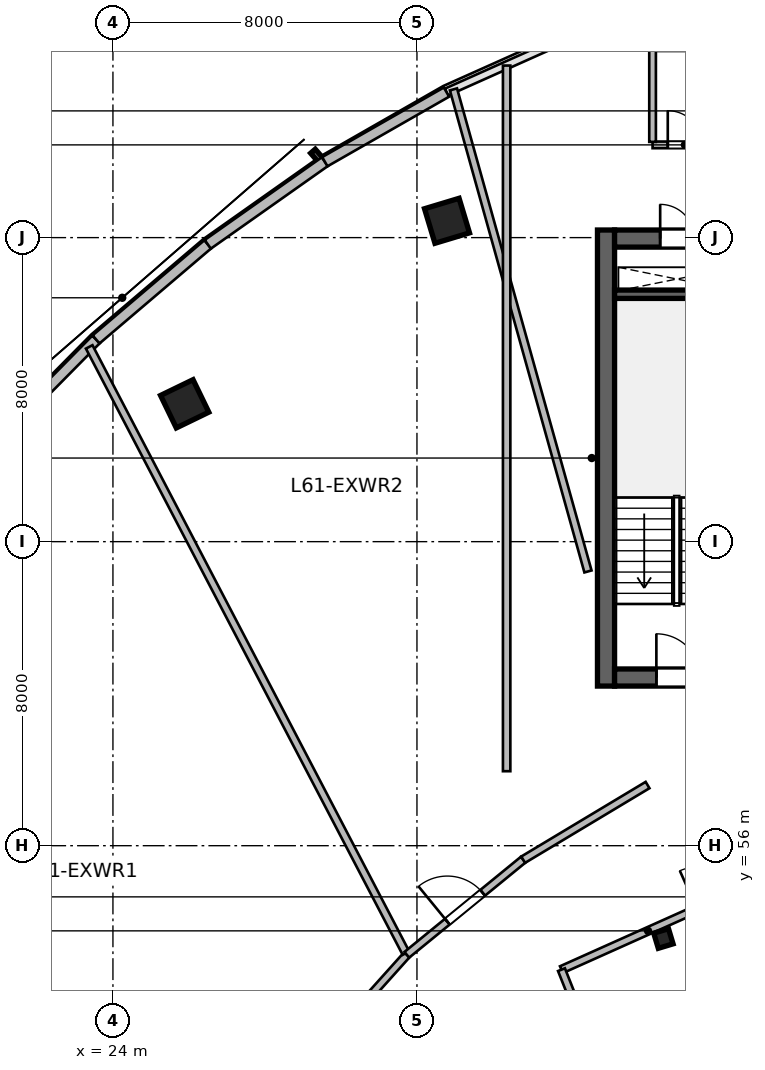
"""IFC4 building model, lengths in metres.
Left out: names, types, materials, properties, quantities, classifications, styles, units other than length and angle.
Written with IfcOpenShell. Run it as: python <this file> out.ifc"""

import sys

from ifc_helpers import new_model, si_unit, direction, frame, frame_2d, origin, origin_2d, place, context, subcontext, project, spatial, rectangle, i_section, extrude, source, transform, mapped, element, fill, save


model = new_model("IFC4")
c1 = context("Model", 3, precision=1e-05, world=origin(), true_north=direction((0.0, 1.0)))
c2 = subcontext(c1, "Body", "Model", "MODEL_VIEW")
j1 = project(units=[si_unit("LENGTHUNIT", "METRE"), si_unit("PLANEANGLEUNIT", "RADIAN")], contexts=[c1])
p1 = place(None, origin())
s1 = spatial("IfcSite", under=j1, at=p1, CompositionType="ELEMENT")
p2 = place(p1, origin())
s2 = spatial("IfcBuilding", under=s1, at=p2, CompositionType="ELEMENT")
p3 = place(p2, frame((0.0, 0.0, 250.8)))
s3 = spatial("IfcBuildingStorey", under=s2, at=p3, CompositionType="ELEMENT", Elevation=250.8)
m1 = source(origin(), c2, "Body", "SweptSolid", [
    extrude(rectangle(XDim=12.0, YDim=0.45, at=frame_2d((6.0, 0.0))), origin(), (0.0, 0.0, 1.0), 3.9),
])
p4 = place(p3, frame((36.975, 60.2, 0.0), z_axis=(0.0, 0.0, 1.0), x_axis=(0.0, 1.0, 0.0)))
e1 = element("IfcWall", 1, at=p4, inside=s3, PredefinedType="SHEAR", context=c2, shape_type="MappedRepresentation", body=[
    mapped(m1, transform((0.0, 0.0, 0.0), scale=1.0)),
])
m2 = source(origin(), c2, "Body", "SweptSolid", [
    extrude(rectangle(XDim=21.6, YDim=0.45, at=frame_2d((10.8, 0.0))), origin(), (0.0, 0.0, 1.0), 3.9),
])
p5 = place(p3, frame((37.2, 60.425, 0.0), z_axis=(0.0, 0.0, 1.0), x_axis=(1.0, 0.0, 0.0)))
e2 = element("IfcWall", 2, at=p5, inside=s3, PredefinedType="SHEAR", context=c2, shape_type="MappedRepresentation", body=[
    mapped(m2, transform((0.0, 0.0, 0.0), scale=1.0)),
])
p6 = place(p5, frame((1.1, 0.0, 0.0)))
e3 = element("IfcOpeningElement", 3, at=p6, cuts=e2, PredefinedType="OPENING", context=c2, shape_type="SweptSolid", body=[
    extrude(rectangle(XDim=1.15, YDim=2.15, at=frame_2d((0.575, 1.075))), frame((0.0, 0.235, 0.0), z_axis=(0.0, -1.0, 0.0), x_axis=(1.0, 0.0, 0.0)), (0.0, 0.0, 1.0), 0.47),
])
p7 = place(p5, frame((19.5, 0.0, 0.0)))
e4 = element("IfcOpeningElement", 4, at=p7, cuts=e2, PredefinedType="OPENING", context=c2, shape_type="SweptSolid", body=[
    extrude(rectangle(XDim=0.9, YDim=2.1, at=frame_2d((0.45, 1.05))), frame((0.0, 0.235, 0.0), z_axis=(0.0, -1.0, 0.0), x_axis=(1.0, 0.0, 0.0)), (0.0, 0.0, 1.0), 0.47),
])
p8 = place(p5, frame((12.02, 0.0, 0.0)))
e5 = element("IfcOpeningElement", 5, at=p8, cuts=e2, PredefinedType="OPENING", context=c2, shape_type="SweptSolid", body=[
    extrude(rectangle(XDim=1.6, YDim=2.15, at=frame_2d((0.8, 1.075))), frame((0.0, 0.235, 0.0), z_axis=(0.0, -1.0, 0.0), x_axis=(1.0, 0.0, 0.0)), (0.0, 0.0, 1.0), 0.47),
])
p9 = place(p3, frame((37.2, 71.975, 0.0), z_axis=(0.0, 0.0, 1.0), x_axis=(1.0, 0.0, 0.0)))
e6 = element("IfcWall", 6, at=p9, inside=s3, PredefinedType="SHEAR", context=c2, shape_type="MappedRepresentation", body=[
    mapped(m2, transform((0.0, 0.0, 0.0), scale=1.0)),
])
p10 = place(p9, frame((1.2, 0.0, 0.0)))
e7 = element("IfcOpeningElement", 7, at=p10, cuts=e6, PredefinedType="OPENING", context=c2, shape_type="SweptSolid", body=[
    extrude(rectangle(XDim=0.9, YDim=2.1, at=frame_2d((0.45, 1.05))), frame((0.0, 0.235, 0.0), z_axis=(0.0, -1.0, 0.0), x_axis=(1.0, 0.0, 0.0)), (0.0, 0.0, 1.0), 0.47),
])
p11 = place(p9, frame((14.7, 0.0, 0.0)))
e8 = element("IfcOpeningElement", 8, at=p11, cuts=e6, PredefinedType="OPENING", context=c2, shape_type="SweptSolid", body=[
    extrude(rectangle(XDim=1.2, YDim=2.15, at=frame_2d((0.6, 1.075))), frame((0.0, 0.235, 0.0), z_axis=(0.0, -1.0, 0.0), x_axis=(1.0, 0.0, 0.0)), (0.0, 0.0, 1.0), 0.47),
])
p12 = place(p9, frame((4.15, 0.0, 0.0)))
e9 = element("IfcOpeningElement", 9, at=p12, cuts=e6, PredefinedType="OPENING", context=c2, shape_type="SweptSolid", body=[
    extrude(rectangle(XDim=1.3, YDim=2.15, at=frame_2d((0.65, 1.075))), frame((0.0, 0.235, 0.0), z_axis=(0.0, -1.0, 0.0), x_axis=(1.0, 0.0, 0.0)), (0.0, 0.0, 1.0), 0.47),
])
p13 = place(p9, frame((7.25, 0.0, 0.0)))
e10 = element("IfcOpeningElement", 10, at=p13, cuts=e6, PredefinedType="OPENING", context=c2, shape_type="SweptSolid", body=[
    extrude(rectangle(XDim=0.9, YDim=2.1, at=frame_2d((0.45, 1.05))), frame((0.0, 0.235, 0.0), z_axis=(0.0, -1.0, 0.0), x_axis=(1.0, 0.0, 0.0)), (0.0, 0.0, 1.0), 0.47),
])
m3 = source(origin(), c2, "Body", "SweptSolid", [
    extrude(rectangle(XDim=3.27, YDim=0.22, at=frame_2d((1.635, 0.0))), origin(), (0.0, 0.0, 1.0), 3.9),
])
p14 = place(p3, frame((37.2, 70.51, 0.0), z_axis=(0.0, 0.0, 1.0), x_axis=(1.0, 0.0, 0.0)))
e11 = element("IfcWall", 11, at=p14, inside=s3, PredefinedType="SHEAR", context=c2, shape_type="MappedRepresentation", body=[
    mapped(m3, transform((0.0, 0.0, 0.0), scale=1.0)),
])
m4 = source(origin(), c2, "Body", "SweptSolid", [
    extrude(rectangle(XDim=0.95, YDim=0.95, at=origin_2d()), origin(), (0.0, 0.0, 1.0), 3.9),
])
p15 = place(p3, frame((25.888, 67.627, 0.0), z_axis=(0.0, 0.0, 1.0), x_axis=(-0.436173672171, 0.899862504889, 0.0)))
e12 = element("IfcColumn", 12, at=p15, inside=s3, PredefinedType="COLUMN", context=c2, shape_type="MappedRepresentation", body=[
    mapped(m4, transform((0.0, 0.0, 0.0), scale=1.0)),
])
m5 = source(origin(), c2, "Body", "SweptSolid", [
    extrude(i_section(OverallWidth=0.406, OverallDepth=0.416, WebThickness=0.03, FlangeThickness=0.048, at=origin_2d()), origin(), (0.0, 0.0, 1.0), 3.9),
])
p16 = place(p3, frame((38.485, 53.558, 0.0), z_axis=(0.0, 0.0, 1.0), x_axis=(-0.288697611798, 0.957420330337, 0.0)))
e13 = element("IfcColumn", 13, at=p16, inside=s3, PredefinedType="COLUMN", context=c2, shape_type="MappedRepresentation", body=[
    mapped(m5, transform((0.0, 0.0, 0.0), scale=1.0)),
])
p17 = place(p3, frame((32.791, 72.442, 0.0), z_axis=(0.0, 0.0, 1.0), x_axis=(-0.288697611798, 0.957420330337, 0.0)))
e14 = element("IfcColumn", 14, at=p17, inside=s3, PredefinedType="COLUMN", context=c2, shape_type="MappedRepresentation", body=[
    mapped(m4, transform((0.0, 0.0, 0.0), scale=1.0)),
])
m6 = source(origin(), c2, "Body", "SweptSolid", [
    extrude(rectangle(XDim=3.955, YDim=0.28, at=frame_2d((1.978, 0.0))), origin(), (0.0, 0.0, 1.0), 3.58),
])
p18 = place(p3, frame((20.776, 66.507, 0.0), z_axis=(0.0, 0.0, 1.0), x_axis=(0.702710517474, 0.711475880569, 0.0)))
e15 = element("IfcWall", 15, at=p18, inside=s3, PredefinedType="SOLIDWALL", context=c2, shape_type="MappedRepresentation", body=[
    mapped(m6, transform((0.0, 0.0, 0.0), scale=1.0)),
])
m7 = source(origin(), c2, "Body", "SweptSolid", [
    extrude(rectangle(XDim=3.86, YDim=0.28, at=frame_2d((1.93, 0.0))), origin(), (0.0, 0.0, 1.0), 3.58),
])
p19 = place(p3, frame((23.556, 69.321, 0.0), z_axis=(0.0, 0.0, 1.0), x_axis=(0.761497547739, 0.648167790613, 0.0)))
e16 = element("IfcWall", 16, at=p19, inside=s3, PredefinedType="SOLIDWALL", context=c2, shape_type="MappedRepresentation", body=[
    mapped(m7, transform((0.0, 0.0, 0.0), scale=1.0)),
])
m8 = source(origin(), c2, "Body", "SweptSolid", [
    extrude(rectangle(XDim=3.77, YDim=0.28, at=frame_2d((1.885, 0.0))), origin(), (0.0, 0.0, 1.0), 3.58),
])
p20 = place(p3, frame((26.495, 71.823, 0.0), z_axis=(0.0, 0.0, 1.0), x_axis=(0.817001958662, 0.576634892755, 0.0)))
e17 = element("IfcWall", 17, at=p20, inside=s3, PredefinedType="SOLIDWALL", context=c2, shape_type="MappedRepresentation", body=[
    mapped(m8, transform((0.0, 0.0, 0.0), scale=1.0)),
])
m9 = source(origin(), c2, "Body", "SweptSolid", [
    extrude(rectangle(XDim=3.688, YDim=0.28, at=frame_2d((1.844, 0.0))), origin(), (0.0, 0.0, 1.0), 3.58),
])
p21 = place(p3, frame((29.576, 73.998, 0.0), z_axis=(0.0, 0.0, 1.0), x_axis=(0.867929289274, 0.496687778005, 0.0)))
e18 = element("IfcWall", 18, at=p21, inside=s3, PredefinedType="SOLIDWALL", context=c2, shape_type="MappedRepresentation", body=[
    mapped(m9, transform((0.0, 0.0, 0.0), scale=1.0)),
])
m10 = source(origin(), c2, "Body", "SweptSolid", [
    extrude(rectangle(XDim=4.0, YDim=0.175, at=frame_2d((2.0, 0.0))), origin(), (0.0, 0.0, 1.0), 3.58),
])
p22 = place(p3, frame((38.2, 74.44, 0.0), z_axis=(0.0, 0.0, 1.0), x_axis=(1.0, 0.0, 0.0)))
e19 = element("IfcWall", 19, at=p22, inside=s3, PredefinedType="PARTITIONING", context=c2, shape_type="MappedRepresentation", body=[
    mapped(m10, transform((0.0, 0.0, 0.0), scale=1.0)),
])
p23 = place(p22, frame((0.4, 0.0, 0.0)))
e20 = element("IfcOpeningElement", 20, at=p23, cuts=e19, PredefinedType="OPENING", context=c2, shape_type="SweptSolid", body=[
    extrude(rectangle(XDim=0.9, YDim=2.08, at=frame_2d((0.45, 1.04))), frame((0.0, 0.098, 0.0), z_axis=(0.0, -1.0, 0.0), x_axis=(1.0, 0.0, 0.0)), (0.0, 0.0, 1.0), 0.195),
])
m11 = source(origin(), c2, "Body", "SweptSolid", [
    extrude(rectangle(XDim=2.403, YDim=0.175, at=frame_2d((1.201, 0.0))), origin(), (0.0, 0.0, 1.0), 3.58),
])
p24 = place(p3, frame((38.2, 74.519, 0.0), z_axis=(0.0, 0.0, 1.0), x_axis=(0.0, 1.0, 0.0)))
e21 = element("IfcWall", 21, at=p24, inside=s3, PredefinedType="PARTITIONING", context=c2, shape_type="MappedRepresentation", body=[
    mapped(m11, transform((0.0, 0.0, 0.0), scale=1.0)),
])
m12 = source(origin(), c2, "Body", "SweptSolid", [
    extrude(rectangle(XDim=8.913, YDim=0.195, at=frame_2d((4.457, 0.0))), origin(), (0.0, 0.0, 1.0), 3.58),
])
p25 = place(p3, frame((35.803, 52.738, 0.0), z_axis=(0.0, 0.0, 1.0), x_axis=(0.912488521546, 0.409102307555, 0.0)))
e22 = element("IfcWall", 22, at=p25, inside=s3, PredefinedType="PARTITIONING", context=c2, shape_type="MappedRepresentation", body=[
    mapped(m12, transform((0.0, 0.0, 0.0), scale=1.0)),
])
p26 = place(p25, frame((3.906, 0.0, 0.0)))
e23 = element("IfcOpeningElement", 23, at=p26, cuts=e22, PredefinedType="OPENING", context=c2, shape_type="SweptSolid", body=[
    extrude(rectangle(XDim=1.1, YDim=2.15, at=frame_2d((0.55, 1.075))), frame((0.0, 0.107, 0.0), z_axis=(0.0, -1.0, 0.0), x_axis=(1.0, 0.0, 0.0)), (0.0, 0.0, 1.0), 0.215),
])
m13 = source(origin(), c2, "Body", "SweptSolid", [
    extrude(rectangle(XDim=3.749, YDim=0.195, at=frame_2d((1.875, 0.0))), origin(), (0.0, 0.0, 1.0), 3.58),
])
p27 = place(p3, frame((37.186, 49.254, 0.0), z_axis=(0.0, 0.0, 1.0), x_axis=(-0.368851771682, 0.92948823044, 0.0)))
e24 = element("IfcWall", 24, at=p27, inside=s3, PredefinedType="PARTITIONING", context=c2, shape_type="MappedRepresentation", body=[
    mapped(m13, transform((0.0, 0.0, 0.0), scale=1.0)),
])
m14 = source(origin(), c2, "Body", "SweptSolid", [
    extrude(rectangle(XDim=5.407, YDim=0.195, at=frame_2d((2.704, 0.0))), origin(), (0.0, 0.0, 1.0), 3.58),
])
p28 = place(p3, frame((28.122, 49.105, 0.0), z_axis=(0.0, 0.0, 1.0), x_axis=(0.667851383423, 0.744294652447, 0.0)))
e25 = element("IfcWall", 25, at=p28, inside=s3, PredefinedType="PARTITIONING", context=c2, shape_type="MappedRepresentation", body=[
    mapped(m14, transform((0.0, 0.0, 0.0), scale=1.0)),
])
m15 = source(origin(), c2, "Body", "SweptSolid", [
    extrude(rectangle(XDim=16.38, YDim=0.195, at=frame_2d((8.19, 0.0))), origin(), (0.0, 0.0, 1.0), 3.58),
])
p29 = place(p3, frame((25.024, 44.369, 0.0), z_axis=(0.0, 0.0, 1.0), x_axis=(-0.716522943697, 0.697563524817, 0.0)))
e26 = element("IfcWall", 26, at=p29, inside=s3, PredefinedType="PARTITIONING", context=c2, shape_type="MappedRepresentation", body=[
    mapped(m15, transform((0.0, 0.0, 0.0), scale=1.0)),
])
m16 = source(origin(), c2, "Body", "SweptSolid", [
    extrude(rectangle(XDim=17.997, YDim=0.195, at=frame_2d((8.999, 0.0))), origin(), (0.0, 0.0, 1.0), 3.58),
])
p30 = place(p3, frame((31.71, 53.174, 0.0), z_axis=(0.0, 0.0, 1.0), x_axis=(-0.463122237503, 0.886294416732, 0.0)))
e27 = element("IfcWall", 27, at=p30, inside=s3, PredefinedType="PARTITIONING", context=c2, shape_type="MappedRepresentation", body=[
    mapped(m16, transform((0.0, 0.0, 0.0), scale=1.0)),
])
m17 = source(origin(), c2, "Body", "SweptSolid", [
    extrude(rectangle(XDim=3.954, YDim=0.195, at=frame_2d((1.977, 0.0))), origin(), (0.0, 0.0, 1.0), 3.58),
])
p31 = place(p3, frame((31.733, 53.13, 0.0), z_axis=(0.0, 0.0, 1.0), x_axis=(0.774345047596, 0.632763579281, 0.0)))
e28 = element("IfcWall", 28, at=p31, inside=s3, PredefinedType="PARTITIONING", context=c2, shape_type="MappedRepresentation", body=[
    mapped(m17, transform((0.0, 0.0, 0.0), scale=1.0)),
])
p32 = place(p31, frame((1.377, 0.0, 0.0)))
e29 = element("IfcOpeningElement", 29, at=p32, cuts=e28, PredefinedType="OPENING", context=c2, shape_type="SweptSolid", body=[
    extrude(rectangle(XDim=1.2, YDim=2.15, at=frame_2d((0.6, 1.075))), frame((0.0, 0.107, 0.0), z_axis=(0.0, -1.0, 0.0), x_axis=(1.0, 0.0, 0.0)), (0.0, 0.0, 1.0), 0.215),
])
m18 = source(origin(), c2, "Body", "SweptSolid", [
    extrude(rectangle(XDim=3.817, YDim=0.195, at=frame_2d((1.909, 0.0))), origin(), (0.0, 0.0, 1.0), 3.58),
])
p33 = place(p3, frame((34.795, 55.632, 0.0), z_axis=(0.0, 0.0, 1.0), x_axis=(0.857453418218, 0.514561595522, 0.0)))
e30 = element("IfcWall", 30, at=p33, inside=s3, PredefinedType="PARTITIONING", context=c2, shape_type="MappedRepresentation", body=[
    mapped(m18, transform((0.0, 0.0, 0.0), scale=1.0)),
])
m19 = source(origin(), c2, "Body", "SweptSolid", [
    extrude(rectangle(XDim=13.169, YDim=0.195, at=frame_2d((6.585, 0.0))), origin(), (0.0, 0.0, 1.0), 3.58),
])
p34 = place(p3, frame((36.5, 63.216, 0.0), z_axis=(0.0, 0.0, 1.0), x_axis=(-0.26875376985, 0.963208913576, 0.0)))
e31 = element("IfcWall", 31, at=p34, inside=s3, PredefinedType="PARTITIONING", context=c2, shape_type="MappedRepresentation", body=[
    mapped(m19, transform((0.0, 0.0, 0.0), scale=1.0)),
])
m20 = source(origin(), c2, "Body", "SweptSolid", [
    extrude(rectangle(XDim=18.567, YDim=0.195, at=frame_2d((9.284, 0.0))), origin(), (0.0, 0.0, 1.0), 3.58),
])
p35 = place(p3, frame((34.36, 57.96, 0.0), z_axis=(0.0, 0.0, 1.0), x_axis=(0.0, 1.0, 0.0)))
e32 = element("IfcWall", 32, at=p35, inside=s3, PredefinedType="PARTITIONING", context=c2, shape_type="MappedRepresentation", body=[
    mapped(m20, transform((0.0, 0.0, 0.0), scale=1.0)),
])
m21 = source(origin(), c2, "Body", "SweptSolid", [
    extrude(rectangle(XDim=1.15, YDim=2.15, at=frame_2d((0.575, 1.075))), frame((0.0, 0.025, 0.0), z_axis=(0.0, -1.0, 0.0), x_axis=(1.0, 0.0, 0.0)), (0.0, 0.0, 1.0), 0.05),
])
p36 = place(p6, origin())
e33 = element("IfcDoor", 33, at=p36, inside=s3, OperationType="SINGLE_SWING_LEFT", PredefinedType="DOOR", context=c2, shape_type="MappedRepresentation", body=[
    mapped(m21, transform((0.0, 0.0, 0.0), scale=1.0)),
])
fill(e3, e33)
m22 = source(origin(), c2, "Body", "SweptSolid", [
    extrude(rectangle(XDim=0.9, YDim=2.1, at=frame_2d((0.45, 1.05))), frame((0.0, 0.025, 0.0), z_axis=(0.0, -1.0, 0.0), x_axis=(1.0, 0.0, 0.0)), (0.0, 0.0, 1.0), 0.05),
])
p37 = place(p10, origin())
e34 = element("IfcDoor", 34, at=p37, inside=s3, OperationType="SINGLE_SWING_LEFT", PredefinedType="DOOR", context=c2, shape_type="MappedRepresentation", body=[
    mapped(m22, transform((0.0, 0.0, 0.0), scale=1.0)),
])
fill(e7, e34)
m23 = source(origin(), c2, "Body", "SweptSolid", [
    extrude(rectangle(XDim=0.9, YDim=2.08, at=frame_2d((0.45, 1.04))), frame((0.0, 0.025, 0.0), z_axis=(0.0, -1.0, 0.0), x_axis=(1.0, 0.0, 0.0)), (0.0, 0.0, 1.0), 0.05),
])
p38 = place(p23, origin())
e35 = element("IfcDoor", 35, at=p38, inside=s3, OperationType="SINGLE_SWING_LEFT", PredefinedType="DOOR", context=c2, shape_type="MappedRepresentation", body=[
    mapped(m23, transform((0.0, 0.0, 0.0), scale=1.0)),
])
fill(e20, e35)
m24 = source(origin(), c2, "Body", "SweptSolid", [
    extrude(rectangle(XDim=1.2, YDim=2.15, at=frame_2d((0.6, 1.075))), frame((0.0, 0.025, 0.0), z_axis=(0.0, -1.0, 0.0), x_axis=(1.0, 0.0, 0.0)), (0.0, 0.0, 1.0), 0.05),
])
p39 = place(p32, origin())
e36 = element("IfcDoor", 36, at=p39, inside=s3, OperationType="SINGLE_SWING_LEFT", PredefinedType="DOOR", context=c2, shape_type="MappedRepresentation", body=[
    mapped(m24, transform((0.0, 0.0, 0.0), scale=1.0)),
])
fill(e29, e36)
save(model, sys.argv[1])
